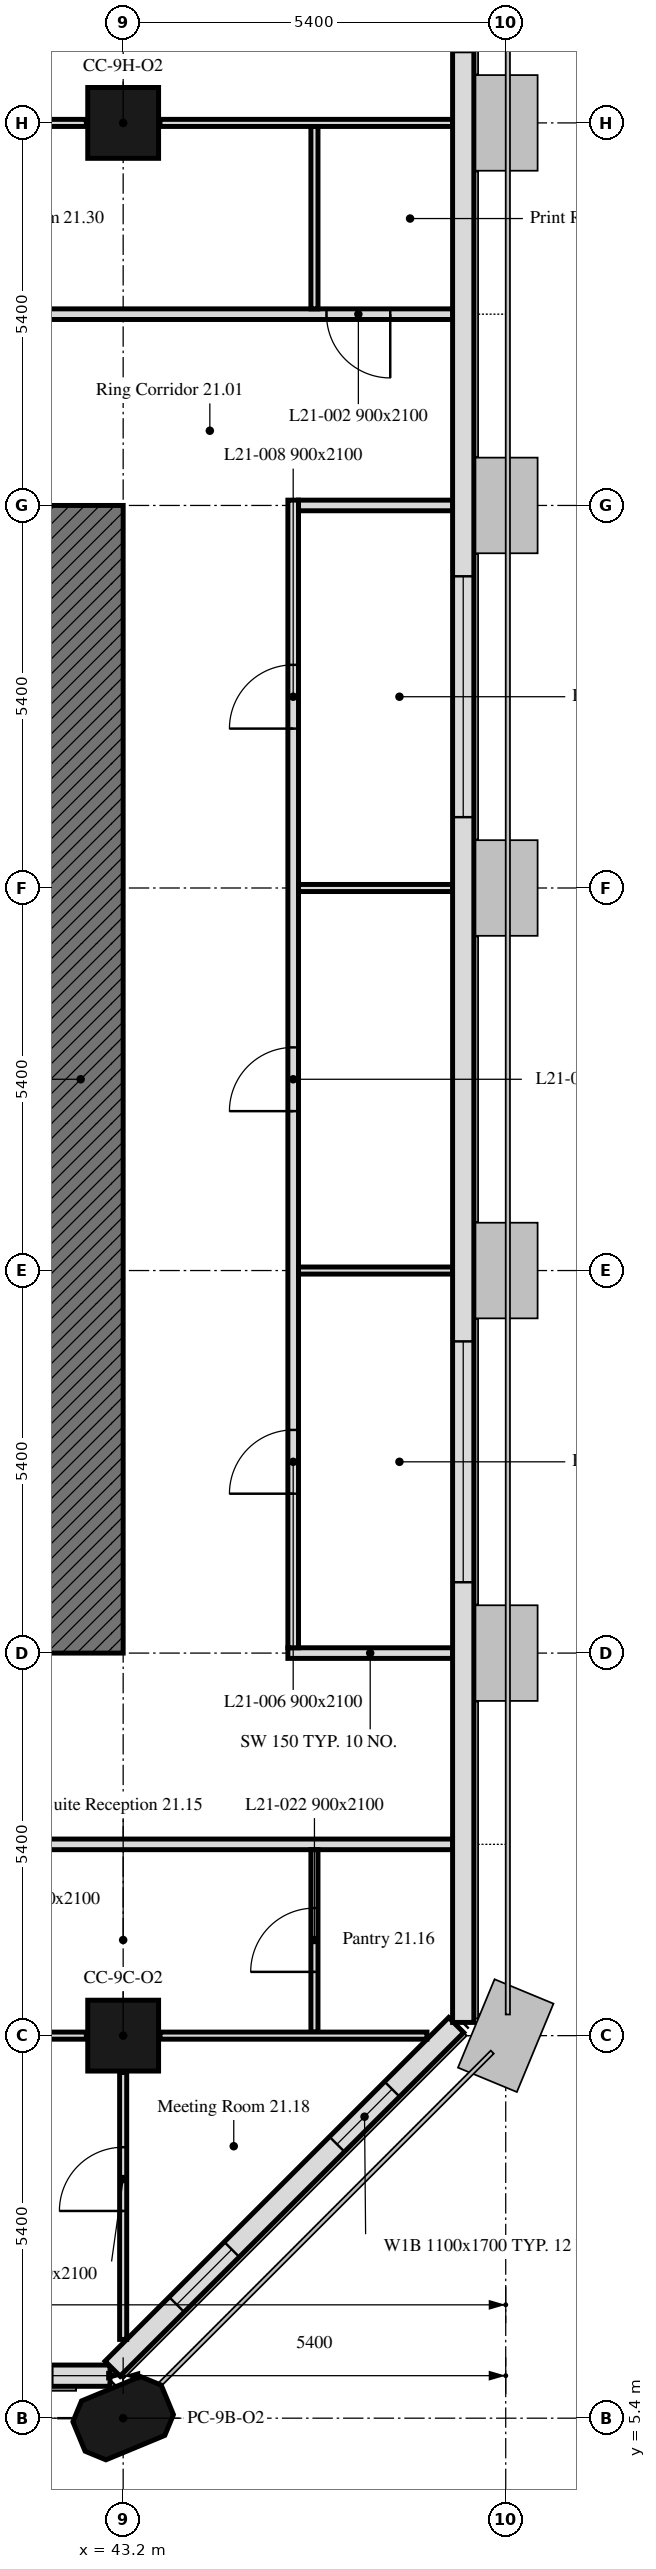
"""IFC4 building model, lengths in metres.
Left out: names, types, materials, properties, quantities, classifications, styles, units other than length and angle.
Written with IfcOpenShell. Run it as: python <this file> out.ifc"""

import sys

from ifc_helpers import new_model, si_unit, direction, frame, frame_2d, origin, origin_2d, place, context, subcontext, project, spatial, polyline, rectangle, outline, extrude, element, fill, save


model = new_model("IFC4")
c1 = context("Model", 3, precision=1e-05, world=origin(), true_north=direction((0.0, 1.0)))
c2 = subcontext(c1, "Body", "Model", "MODEL_VIEW")
j1 = project(units=[si_unit("LENGTHUNIT", "METRE"), si_unit("PLANEANGLEUNIT", "RADIAN")], contexts=[c1])
p1 = place(None, origin())
s1 = spatial("IfcSite", under=j1, at=p1, CompositionType="ELEMENT")
p2 = place(p1, origin())
s2 = spatial("IfcBuilding", under=s1, at=p2, CompositionType="ELEMENT")
p3 = place(p2, frame((0.0, 0.0, 91.6)))
s3 = spatial("IfcBuildingStorey", under=s2, at=p3, CompositionType="ELEMENT", Elevation=91.6)
p4 = place(p3, frame((43.2, 5.4, 0.0), z_axis=(0.0, 0.0, 1.0), x_axis=(0.923879532511, 0.382683432365, 0.0)))
e1 = element("IfcColumn", 1, at=p4, inside=s3, PredefinedType="COLUMN", context=c2, shape_type="SweptSolid", body=[
    extrude(outline(polyline([(-0.45, -0.45), (0.45, -0.45), (0.675, -0.225), (0.675, 0.225), (0.45, 0.45), (-0.45, 0.45), (-0.675, 0.225), (-0.675, -0.225), (-0.45, -0.45)])), origin(), (0.0, 0.0, 1.0), 3.5),
])
for number, where, z_axis, x_axis in (
    (2, (43.2, 10.8, 0.0), (0.0, 0.0, 1.0), (1.0, 0.0, 0.0)),
    (3, (43.2, 37.8, 0.0), (0.0, 0.0, 1.0), (1.0, 0.0, 0.0)),
):
    element("IfcColumn", number, at=place(p3, frame(where, z_axis=z_axis, x_axis=x_axis)), inside=s3, PredefinedType="COLUMN", context=c2, shape_type="SweptSolid", body=[
        extrude(rectangle(XDim=1.0, YDim=1.0, at=origin_2d()), origin(), (0.0, 0.0, 1.0), 3.5),
    ])
p5 = place(p3, frame((10.986, 6.0, 0.0), z_axis=(0.0, 0.0, 1.0), x_axis=(1.0, 0.0, 0.0)))
e4 = element("IfcWall", 4, at=p5, inside=s3, PredefinedType="SOLIDWALL", context=c2, shape_type="SweptSolid", body=[
    extrude(rectangle(XDim=32.027, YDim=0.3, at=frame_2d((16.014, 0.0))), origin(), (0.0, 0.0, 1.0), 3.5),
])
p6 = place(p5, frame((6.214, 0.0, 0.9)))
e5 = element("IfcOpeningElement", 5, at=p6, cuts=e4, PredefinedType="OPENING", context=c2, shape_type="SweptSolid", body=[
    extrude(rectangle(XDim=3.4, YDim=1.7, at=frame_2d((1.7, 0.85))), frame((0.0, 0.16, 0.0), z_axis=(0.0, -1.0, 0.0), x_axis=(1.0, 0.0, 0.0)), (0.0, 0.0, 1.0), 0.32),
])
p7 = place(p5, frame((17.014, 0.0, 0.9)))
e6 = element("IfcOpeningElement", 6, at=p7, cuts=e4, PredefinedType="OPENING", context=c2, shape_type="SweptSolid", body=[
    extrude(rectangle(XDim=3.4, YDim=1.7, at=frame_2d((1.7, 0.85))), frame((0.0, 0.16, 0.0), z_axis=(0.0, -1.0, 0.0), x_axis=(1.0, 0.0, 0.0)), (0.0, 0.0, 1.0), 0.32),
])
p8 = place(p5, frame((27.814, 0.0, 0.9)))
e7 = element("IfcOpeningElement", 7, at=p8, cuts=e4, PredefinedType="OPENING", context=c2, shape_type="SweptSolid", body=[
    extrude(rectangle(XDim=3.4, YDim=1.7, at=frame_2d((1.7, 0.85))), frame((0.0, 0.16, 0.0), z_axis=(0.0, -1.0, 0.0), x_axis=(1.0, 0.0, 0.0)), (0.0, 0.0, 1.0), 0.32),
])
p9 = place(p3, frame((43.051, 6.099, 0.0), z_axis=(0.0, 0.0, 1.0), x_axis=(0.707106781187, 0.707106781187, 0.0)))
e8 = element("IfcWall", 8, at=p9, inside=s3, PredefinedType="SOLIDWALL", context=c2, shape_type="SweptSolid", body=[
    extrude(rectangle(XDim=6.86, YDim=0.3, at=frame_2d((3.43, 0.0))), origin(), (0.0, 0.0, 1.0), 3.5),
])
p10 = place(p9, frame((1.28, 0.0, 0.9)))
e9 = element("IfcOpeningElement", 9, at=p10, cuts=e8, PredefinedType="OPENING", context=c2, shape_type="SweptSolid", body=[
    extrude(rectangle(XDim=1.1, YDim=1.7, at=frame_2d((0.55, 0.85))), frame((0.0, 0.16, 0.0), z_axis=(0.0, -1.0, 0.0), x_axis=(1.0, 0.0, 0.0)), (0.0, 0.0, 1.0), 0.32),
])
p11 = place(p9, frame((4.48, 0.0, 0.9)))
e10 = element("IfcOpeningElement", 10, at=p11, cuts=e8, PredefinedType="OPENING", context=c2, shape_type="SweptSolid", body=[
    extrude(rectangle(XDim=1.1, YDim=1.7, at=frame_2d((0.55, 0.85))), frame((0.0, 0.16, 0.0), z_axis=(0.0, -1.0, 0.0), x_axis=(1.0, 0.0, 0.0)), (0.0, 0.0, 1.0), 0.32),
])
p12 = place(p3, frame((48.0, 10.986, 0.0), z_axis=(0.0, 0.0, 1.0), x_axis=(0.0, 1.0, 0.0)))
e11 = element("IfcWall", 11, at=p12, inside=s3, PredefinedType="SOLIDWALL", context=c2, shape_type="SweptSolid", body=[
    extrude(rectangle(XDim=32.027, YDim=0.3, at=frame_2d((16.014, 0.0))), origin(), (0.0, 0.0, 1.0), 3.5),
])
p13 = place(p12, frame((6.214, 0.0, 0.9)))
e12 = element("IfcOpeningElement", 12, at=p13, cuts=e11, PredefinedType="OPENING", context=c2, shape_type="SweptSolid", body=[
    extrude(rectangle(XDim=3.4, YDim=1.7, at=frame_2d((1.7, 0.85))), frame((0.0, 0.16, 0.0), z_axis=(0.0, -1.0, 0.0), x_axis=(1.0, 0.0, 0.0)), (0.0, 0.0, 1.0), 0.32),
])
p14 = place(p12, frame((17.014, 0.0, 0.9)))
e13 = element("IfcOpeningElement", 13, at=p14, cuts=e11, PredefinedType="OPENING", context=c2, shape_type="SweptSolid", body=[
    extrude(rectangle(XDim=3.4, YDim=1.7, at=frame_2d((1.7, 0.85))), frame((0.0, 0.16, 0.0), z_axis=(0.0, -1.0, 0.0), x_axis=(1.0, 0.0, 0.0)), (0.0, 0.0, 1.0), 0.32),
])
p15 = place(p12, frame((27.814, 0.0, 0.9)))
e14 = element("IfcOpeningElement", 14, at=p15, cuts=e11, PredefinedType="OPENING", context=c2, shape_type="SweptSolid", body=[
    extrude(rectangle(XDim=3.4, YDim=1.7, at=frame_2d((1.7, 0.85))), frame((0.0, 0.16, 0.0), z_axis=(0.0, -1.0, 0.0), x_axis=(1.0, 0.0, 0.0)), (0.0, 0.0, 1.0), 0.32),
])
p16 = place(p3, frame((42.6, 32.4, 0.0), z_axis=(0.0, 0.0, 1.0), x_axis=(0.0, -1.0, 0.0)))
e15 = element("IfcWall", 15, at=p16, inside=s3, PredefinedType="SOLIDWALL", context=c2, shape_type="SweptSolid", body=[
    extrude(rectangle(XDim=16.2, YDim=1.2, at=frame_2d((8.1, 0.0))), origin(), (0.0, 0.0, 1.0), 3.5),
])
p17 = place(p3, frame((47.849, 16.2, 0.0), z_axis=(0.0, 0.0, 1.0), x_axis=(-1.0, 0.0, 0.0)))
e16 = element("IfcWall", 16, at=p17, inside=s3, PredefinedType="PARTITIONING", context=c2, shape_type="SweptSolid", body=[
    extrude(rectangle(XDim=2.324, YDim=0.15, at=frame_2d((1.162, 0.0))), origin(), (0.0, 0.0, 1.0), 2.75),
])
p18 = place(p3, frame((45.6, 16.275, 0.0), z_axis=(0.0, 0.0, 1.0), x_axis=(0.0, 1.0, 0.0)))
e17 = element("IfcWall", 17, at=p18, inside=s3, PredefinedType="PARTITIONING", context=c2, shape_type="SweptSolid", body=[
    extrude(rectangle(XDim=16.2, YDim=0.15, at=frame_2d((8.1, 0.0))), origin(), (0.0, 0.0, 1.0), 2.75),
])
p19 = place(p18, frame((2.175, 0.0, 0.0)))
e18 = element("IfcOpeningElement", 18, at=p19, cuts=e17, PredefinedType="OPENING", context=c2, shape_type="SweptSolid", body=[
    extrude(rectangle(XDim=0.9, YDim=2.1, at=frame_2d((0.45, 1.05))), frame((0.0, 0.075, 0.0), z_axis=(0.0, -1.0, 0.0), x_axis=(1.0, 0.0, 0.0)), (0.0, 0.0, 1.0), 0.15),
])
p20 = place(p18, frame((7.575, 0.0, 0.0)))
e19 = element("IfcOpeningElement", 19, at=p20, cuts=e17, PredefinedType="OPENING", context=c2, shape_type="SweptSolid", body=[
    extrude(rectangle(XDim=0.9, YDim=2.1, at=frame_2d((0.45, 1.05))), frame((0.0, 0.075, 0.0), z_axis=(0.0, -1.0, 0.0), x_axis=(1.0, 0.0, 0.0)), (0.0, 0.0, 1.0), 0.15),
])
p21 = place(p18, frame((12.975, 0.0, 0.0)))
e20 = element("IfcOpeningElement", 20, at=p21, cuts=e17, PredefinedType="OPENING", context=c2, shape_type="SweptSolid", body=[
    extrude(rectangle(XDim=0.9, YDim=2.1, at=frame_2d((0.45, 1.05))), frame((0.0, 0.075, 0.0), z_axis=(0.0, -1.0, 0.0), x_axis=(1.0, 0.0, 0.0)), (0.0, 0.0, 1.0), 0.15),
])
p22 = place(p3, frame((45.675, 32.4, 0.0), z_axis=(0.0, 0.0, 1.0), x_axis=(1.0, 0.0, 0.0)))
e21 = element("IfcWall", 21, at=p22, inside=s3, PredefinedType="PARTITIONING", context=c2, shape_type="SweptSolid", body=[
    extrude(rectangle(XDim=2.174, YDim=0.15, at=frame_2d((1.087, 0.0))), origin(), (0.0, 0.0, 1.0), 2.75),
])
p23 = place(p3, frame((47.849, 35.1, 0.0), z_axis=(0.0, 0.0, 1.0), x_axis=(-1.0, 0.0, 0.0)))
e22 = element("IfcWall", 22, at=p23, inside=s3, PredefinedType="PARTITIONING", context=c2, shape_type="SweptSolid", body=[
    extrude(rectangle(XDim=41.698, YDim=0.15, at=frame_2d((20.849, 0.0))), origin(), (0.0, 0.0, 1.0), 2.75),
])
p24 = place(p23, frame((22.479, 0.0, 0.0)))
e23 = element("IfcOpeningElement", 23, at=p24, cuts=e22, PredefinedType="OPENING", context=c2, shape_type="SweptSolid", body=[
    extrude(rectangle(XDim=0.9, YDim=2.1, at=frame_2d((0.45, 1.05))), frame((0.0, 0.075, 0.0), z_axis=(0.0, -1.0, 0.0), x_axis=(1.0, 0.0, 0.0)), (0.0, 0.0, 1.0), 0.15),
])
p25 = place(p23, frame((0.879, 0.0, 0.0)))
e24 = element("IfcOpeningElement", 24, at=p25, cuts=e22, PredefinedType="OPENING", context=c2, shape_type="SweptSolid", body=[
    extrude(rectangle(XDim=0.9, YDim=2.1, at=frame_2d((0.45, 1.05))), frame((0.0, 0.075, 0.0), z_axis=(0.0, -1.0, 0.0), x_axis=(1.0, 0.0, 0.0)), (0.0, 0.0, 1.0), 0.15),
])
p26 = place(p23, frame((38.624, 0.0, 0.0)))
e25 = element("IfcOpeningElement", 25, at=p26, cuts=e22, PredefinedType="OPENING", context=c2, shape_type="SweptSolid", body=[
    extrude(rectangle(XDim=0.9, YDim=2.1, at=frame_2d((0.45, 1.05))), frame((0.0, 0.075, 0.0), z_axis=(0.0, -1.0, 0.0), x_axis=(1.0, 0.0, 0.0)), (0.0, 0.0, 1.0), 0.15),
])
p27 = place(p23, frame((17.699, 0.0, 0.0)))
e26 = element("IfcOpeningElement", 26, at=p27, cuts=e22, PredefinedType="OPENING", context=c2, shape_type="SweptSolid", body=[
    extrude(rectangle(XDim=0.9, YDim=2.1, at=frame_2d((0.45, 1.05))), frame((0.0, 0.075, 0.0), z_axis=(0.0, -1.0, 0.0), x_axis=(1.0, 0.0, 0.0)), (0.0, 0.0, 1.0), 0.15),
])
p28 = place(p3, frame((6.151, 13.5, 0.0), z_axis=(0.0, 0.0, 1.0), x_axis=(1.0, 0.0, 0.0)))
e27 = element("IfcWall", 27, at=p28, inside=s3, PredefinedType="PARTITIONING", context=c2, shape_type="SweptSolid", body=[
    extrude(rectangle(XDim=41.698, YDim=0.15, at=frame_2d((20.849, 0.0))), origin(), (0.0, 0.0, 1.0), 3.5),
])
p29 = place(p28, frame((0.879, 0.0, 0.0)))
e28 = element("IfcOpeningElement", 28, at=p29, cuts=e27, PredefinedType="OPENING", context=c2, shape_type="SweptSolid", body=[
    extrude(rectangle(XDim=0.9, YDim=2.1, at=frame_2d((0.45, 1.05))), frame((0.0, 0.075, 0.0), z_axis=(0.0, -1.0, 0.0), x_axis=(1.0, 0.0, 0.0)), (0.0, 0.0, 1.0), 0.15),
])
p30 = place(p28, frame((17.079, 0.0, 0.0)))
e29 = element("IfcOpeningElement", 29, at=p30, cuts=e27, PredefinedType="OPENING", context=c2, shape_type="SweptSolid", body=[
    extrude(rectangle(XDim=0.9, YDim=2.1, at=frame_2d((0.45, 1.05))), frame((0.0, 0.075, 0.0), z_axis=(0.0, -1.0, 0.0), x_axis=(1.0, 0.0, 0.0)), (0.0, 0.0, 1.0), 0.15),
])
p31 = place(p28, frame((33.279, 0.0, 0.0)))
e30 = element("IfcOpeningElement", 30, at=p31, cuts=e27, PredefinedType="OPENING", context=c2, shape_type="SweptSolid", body=[
    extrude(rectangle(XDim=0.9, YDim=2.1, at=frame_2d((0.45, 1.05))), frame((0.0, 0.075, 0.0), z_axis=(0.0, -1.0, 0.0), x_axis=(1.0, 0.0, 0.0)), (0.0, 0.0, 1.0), 0.15),
])
p32 = place(p28, frame((11.679, 0.0, 0.0)))
e31 = element("IfcOpeningElement", 31, at=p32, cuts=e27, PredefinedType="OPENING", context=c2, shape_type="SweptSolid", body=[
    extrude(rectangle(XDim=0.9, YDim=2.1, at=frame_2d((0.45, 1.05))), frame((0.0, 0.075, 0.0), z_axis=(0.0, -1.0, 0.0), x_axis=(1.0, 0.0, 0.0)), (0.0, 0.0, 1.0), 0.15),
])
p33 = place(p28, frame((34.519, 0.0, 0.0)))
e32 = element("IfcOpeningElement", 32, at=p33, cuts=e27, PredefinedType="OPENING", context=c2, shape_type="SweptSolid", body=[
    extrude(rectangle(XDim=0.9, YDim=2.1, at=frame_2d((0.45, 1.05))), frame((0.0, 0.075, 0.0), z_axis=(0.0, -1.0, 0.0), x_axis=(1.0, 0.0, 0.0)), (0.0, 0.0, 1.0), 0.15),
])
p34 = place(p3, frame((45.9, 35.175, 0.0), z_axis=(0.0, 0.0, 1.0), x_axis=(0.0, 1.0, 0.0)))
e33 = element("IfcWall", 33, at=p34, inside=s3, PredefinedType="PARTITIONING", context=c2, shape_type="SweptSolid", body=[
    extrude(rectangle(XDim=2.575, YDim=0.1, at=frame_2d((1.288, 0.0))), origin(), (0.0, 0.0, 1.0), 3.5),
])
p35 = place(p3, frame((42.68, 37.8, 0.0), z_axis=(0.0, 0.0, 1.0), x_axis=(-1.0, 0.0, 0.0)))
e34 = element("IfcWall", 34, at=p35, inside=s3, PredefinedType="PARTITIONING", context=c2, shape_type="SweptSolid", body=[
    extrude(rectangle(XDim=4.36, YDim=0.1, at=frame_2d((2.18, 0.0))), origin(), (0.0, 0.0, 1.0), 2.75),
])
p36 = place(p35, frame((1.73, 0.0, 0.0)))
e35 = element("IfcOpeningElement", 35, at=p36, cuts=e34, PredefinedType="OPENING", context=c2, shape_type="SweptSolid", body=[
    extrude(rectangle(XDim=0.9, YDim=2.1, at=frame_2d((0.45, 1.05))), frame((0.0, 0.05, 0.0), z_axis=(0.0, -1.0, 0.0), x_axis=(1.0, 0.0, 0.0)), (0.0, 0.0, 1.0), 0.1),
])
p37 = place(p3, frame((47.849, 37.8, 0.0), z_axis=(0.0, 0.0, 1.0), x_axis=(-1.0, 0.0, 0.0)))
e36 = element("IfcWall", 36, at=p37, inside=s3, PredefinedType="PARTITIONING", context=c2, shape_type="SweptSolid", body=[
    extrude(rectangle(XDim=4.129, YDim=0.1, at=frame_2d((2.064, 0.0))), origin(), (0.0, 0.0, 1.0), 2.75),
])
p38 = place(p3, frame((38.32, 10.8, 0.0), z_axis=(0.0, 0.0, 1.0), x_axis=(1.0, 0.0, 0.0)))
e37 = element("IfcWall", 37, at=p38, inside=s3, PredefinedType="PARTITIONING", context=c2, shape_type="SweptSolid", body=[
    extrude(rectangle(XDim=4.36, YDim=0.1, at=frame_2d((2.18, 0.0))), origin(), (0.0, 0.0, 1.0), 3.5),
])
p39 = place(p38, frame((2.35, 0.0, 0.0)))
e38 = element("IfcOpeningElement", 38, at=p39, cuts=e37, PredefinedType="OPENING", context=c2, shape_type="SweptSolid", body=[
    extrude(rectangle(XDim=0.9, YDim=2.1, at=frame_2d((0.45, 1.05))), frame((0.0, 0.05, 0.0), z_axis=(0.0, -1.0, 0.0), x_axis=(1.0, 0.0, 0.0)), (0.0, 0.0, 1.0), 0.1),
])
p40 = place(p3, frame((45.9, 10.85, 0.0), z_axis=(0.0, 0.0, 1.0), x_axis=(0.0, 1.0, 0.0)))
e39 = element("IfcWall", 39, at=p40, inside=s3, PredefinedType="PARTITIONING", context=c2, shape_type="SweptSolid", body=[
    extrude(rectangle(XDim=2.575, YDim=0.1, at=frame_2d((1.288, 0.0))), origin(), (0.0, 0.0, 1.0), 3.5),
])
p41 = place(p40, frame((0.85, 0.0, 0.0)))
e40 = element("IfcOpeningElement", 40, at=p41, cuts=e39, PredefinedType="OPENING", context=c2, shape_type="SweptSolid", body=[
    extrude(rectangle(XDim=0.9, YDim=2.1, at=frame_2d((0.45, 1.05))), frame((0.0, 0.05, 0.0), z_axis=(0.0, -1.0, 0.0), x_axis=(1.0, 0.0, 0.0)), (0.0, 0.0, 1.0), 0.1),
])
p42 = place(p3, frame((43.72, 10.8, 0.0), z_axis=(0.0, 0.0, 1.0), x_axis=(1.0, 0.0, 0.0)))
e41 = element("IfcWall", 41, at=p42, inside=s3, PredefinedType="PARTITIONING", context=c2, shape_type="SweptSolid", body=[
    extrude(rectangle(XDim=3.768, YDim=0.1, at=frame_2d((1.884, 0.0))), origin(), (0.0, 0.0, 1.0), 3.5),
])
p43 = place(p3, frame((43.2, 6.512, 0.0), z_axis=(0.0, 0.0, 1.0), x_axis=(0.0, 1.0, 0.0)))
e42 = element("IfcWall", 42, at=p43, inside=s3, PredefinedType="PARTITIONING", context=c2, shape_type="SweptSolid", body=[
    extrude(rectangle(XDim=3.768, YDim=0.1, at=frame_2d((1.884, 0.0))), origin(), (0.0, 0.0, 1.0), 3.5),
])
p44 = place(p43, frame((1.813, 0.0, 0.0)))
e43 = element("IfcOpeningElement", 43, at=p44, cuts=e42, PredefinedType="OPENING", context=c2, shape_type="SweptSolid", body=[
    extrude(rectangle(XDim=0.9, YDim=2.1, at=frame_2d((0.45, 1.05))), frame((0.0, 0.05, 0.0), z_axis=(0.0, -1.0, 0.0), x_axis=(1.0, 0.0, 0.0)), (0.0, 0.0, 1.0), 0.1),
])
for number, where, z_axis, x_axis in (
    (44, (47.849, 21.6, 0.0), (0.0, 0.0, 1.0), (-1.0, 0.0, 0.0)),
    (45, (47.849, 27.0, 0.0), (0.0, 0.0, 1.0), (-1.0, 0.0, 0.0)),
):
    element("IfcWall", number, at=place(p3, frame(where, z_axis=z_axis, x_axis=x_axis)), inside=s3, PredefinedType="PARTITIONING", context=c2, shape_type="SweptSolid", body=[
        extrude(rectangle(XDim=2.174, YDim=0.1, at=frame_2d((1.087, 0.0))), origin(), (0.0, 0.0, 1.0), 2.75),
    ])
p45 = place(p10, origin())
e46 = element("IfcWindow", 46, at=p45, inside=s3, PartitioningType="SINGLE_PANEL", PredefinedType="WINDOW", context=c2, shape_type="SweptSolid", body=[
    extrude(rectangle(XDim=1.1, YDim=1.7, at=frame_2d((0.55, 0.85))), frame((0.0, 0.03, 0.0), z_axis=(0.0, -1.0, 0.0), x_axis=(1.0, 0.0, 0.0)), (0.0, 0.0, 1.0), 0.06),
])
fill(e9, e46)
p46 = place(p11, origin())
e47 = element("IfcWindow", 47, at=p46, inside=s3, PartitioningType="SINGLE_PANEL", PredefinedType="WINDOW", context=c2, shape_type="SweptSolid", body=[
    extrude(rectangle(XDim=1.1, YDim=1.7, at=frame_2d((0.55, 0.85))), frame((0.0, 0.03, 0.0), z_axis=(0.0, -1.0, 0.0), x_axis=(1.0, 0.0, 0.0)), (0.0, 0.0, 1.0), 0.06),
])
fill(e10, e47)
p47 = place(p13, origin())
e48 = element("IfcWindow", 48, at=p47, inside=s3, PartitioningType="SINGLE_PANEL", PredefinedType="WINDOW", context=c2, shape_type="SweptSolid", body=[
    extrude(rectangle(XDim=3.4, YDim=1.7, at=frame_2d((1.7, 0.85))), frame((0.0, 0.03, 0.0), z_axis=(0.0, -1.0, 0.0), x_axis=(1.0, 0.0, 0.0)), (0.0, 0.0, 1.0), 0.06),
])
fill(e12, e48)
p48 = place(p14, origin())
e49 = element("IfcWindow", 49, at=p48, inside=s3, PartitioningType="SINGLE_PANEL", PredefinedType="WINDOW", context=c2, shape_type="SweptSolid", body=[
    extrude(rectangle(XDim=3.4, YDim=1.7, at=frame_2d((1.7, 0.85))), frame((0.0, 0.03, 0.0), z_axis=(0.0, -1.0, 0.0), x_axis=(1.0, 0.0, 0.0)), (0.0, 0.0, 1.0), 0.06),
])
fill(e13, e49)
p49 = place(p25, origin())
e50 = element("IfcDoor", 50, at=p49, inside=s3, OperationType="SINGLE_SWING_LEFT", PredefinedType="DOOR", context=c2, shape_type="SweptSolid", body=[
    extrude(rectangle(XDim=0.9, YDim=2.1, at=frame_2d((0.45, 1.05))), frame((0.0, 0.025, 0.0), z_axis=(0.0, -1.0, 0.0), x_axis=(1.0, 0.0, 0.0)), (0.0, 0.0, 1.0), 0.05),
])
fill(e24, e50)
p50 = place(p19, origin())
e51 = element("IfcDoor", 51, at=p50, inside=s3, OperationType="SINGLE_SWING_RIGHT", PredefinedType="DOOR", context=c2, shape_type="SweptSolid", body=[
    extrude(rectangle(XDim=0.9, YDim=2.1, at=frame_2d((0.45, 1.05))), frame((0.0, 0.025, 0.0), z_axis=(0.0, -1.0, 0.0), x_axis=(1.0, 0.0, 0.0)), (0.0, 0.0, 1.0), 0.05),
])
fill(e18, e51)
p51 = place(p20, origin())
e52 = element("IfcDoor", 52, at=p51, inside=s3, OperationType="SINGLE_SWING_RIGHT", PredefinedType="DOOR", context=c2, shape_type="SweptSolid", body=[
    extrude(rectangle(XDim=0.9, YDim=2.1, at=frame_2d((0.45, 1.05))), frame((0.0, 0.025, 0.0), z_axis=(0.0, -1.0, 0.0), x_axis=(1.0, 0.0, 0.0)), (0.0, 0.0, 1.0), 0.05),
])
fill(e19, e52)
p52 = place(p21, origin())
e53 = element("IfcDoor", 53, at=p52, inside=s3, OperationType="SINGLE_SWING_RIGHT", PredefinedType="DOOR", context=c2, shape_type="SweptSolid", body=[
    extrude(rectangle(XDim=0.9, YDim=2.1, at=frame_2d((0.45, 1.05))), frame((0.0, 0.025, 0.0), z_axis=(0.0, -1.0, 0.0), x_axis=(1.0, 0.0, 0.0)), (0.0, 0.0, 1.0), 0.05),
])
fill(e20, e53)
p53 = place(p41, origin())
e54 = element("IfcDoor", 54, at=p53, inside=s3, OperationType="SINGLE_SWING_LEFT", PredefinedType="DOOR", context=c2, shape_type="SweptSolid", body=[
    extrude(rectangle(XDim=0.9, YDim=2.1, at=frame_2d((0.45, 1.05))), frame((0.0, 0.025, 0.0), z_axis=(0.0, -1.0, 0.0), x_axis=(1.0, 0.0, 0.0)), (0.0, 0.0, 1.0), 0.05),
])
fill(e40, e54)
p54 = place(p44, origin())
e55 = element("IfcDoor", 55, at=p54, inside=s3, OperationType="SINGLE_SWING_RIGHT", PredefinedType="DOOR", context=c2, shape_type="SweptSolid", body=[
    extrude(rectangle(XDim=0.9, YDim=2.1, at=frame_2d((0.45, 1.05))), frame((0.0, 0.025, 0.0), z_axis=(0.0, -1.0, 0.0), x_axis=(1.0, 0.0, 0.0)), (0.0, 0.0, 1.0), 0.05),
])
fill(e43, e55)
save(model, sys.argv[1])
